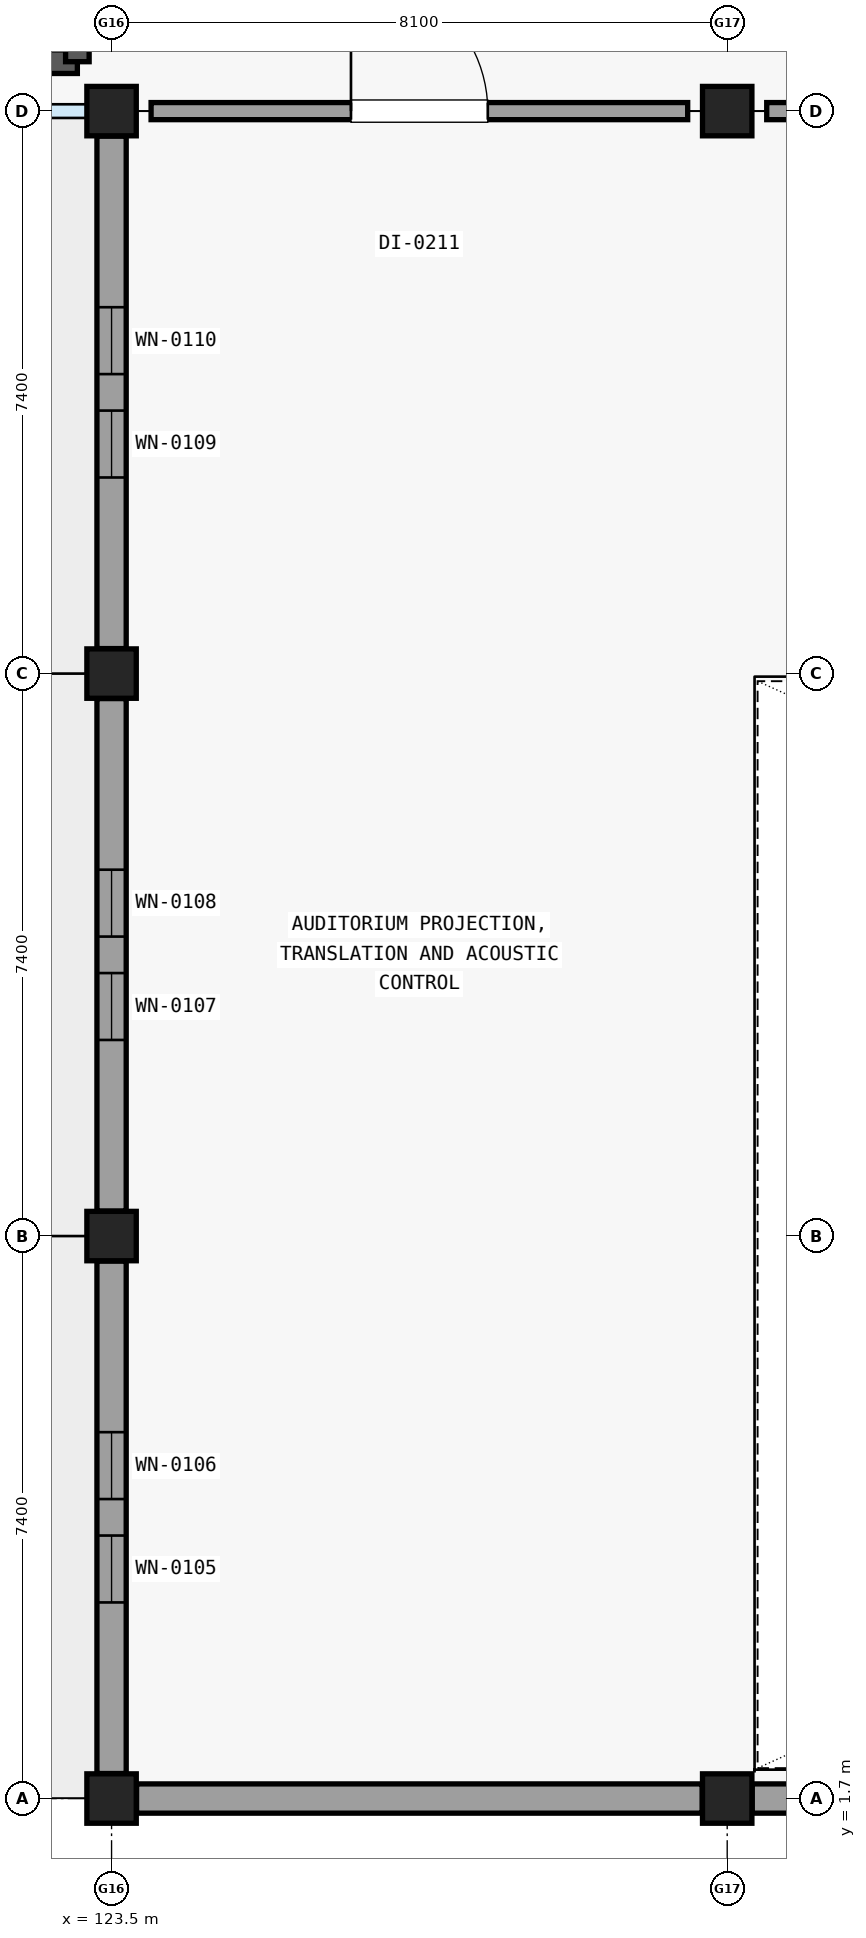
"""IFC4 building model, lengths in metres.
Left out: names, types, materials, properties, quantities, classifications, styles, units other than length and angle.
Written with IfcOpenShell. Run it as: python <this file> out.ifc"""

import sys

from ifc_helpers import new_model, si_unit, direction, frame, frame_2d, origin, origin_2d, place, context, subcontext, project, spatial, rectangle, extrude, element, fill, save


model = new_model("IFC4")
c1 = context("Model", 3, precision=1e-05, world=origin(), true_north=direction((0.0, 1.0)))
c2 = subcontext(c1, "Body", "Model", "MODEL_VIEW")
j1 = project(units=[si_unit("LENGTHUNIT", "METRE"), si_unit("PLANEANGLEUNIT", "RADIAN")], contexts=[c1])
p1 = place(None, origin())
s1 = spatial("IfcSite", under=j1, at=p1, CompositionType="ELEMENT")
p2 = place(p1, origin())
s2 = spatial("IfcBuilding", under=s1, at=p2, CompositionType="ELEMENT")
p3 = place(p2, frame((0.0, 0.0, 5.4)))
s3 = spatial("IfcBuildingStorey", under=s2, at=p3, CompositionType="ELEMENT", Elevation=5.4)
for number, where, z_axis, x_axis in (
    (1, (123.5, 1.7, 0.0), (0.0, 0.0, 1.0), (1.0, 0.0, 0.0)),
    (2, (123.5, 9.1, 0.0), (0.0, 0.0, 1.0), (1.0, 0.0, 0.0)),
    (3, (123.5, 16.5, 0.0), (0.0, 0.0, 1.0), (1.0, 0.0, 0.0)),
    (4, (123.5, 23.9, 0.0), (0.0, 0.0, 1.0), (1.0, 0.0, 0.0)),
    (5, (131.6, 1.7, 0.0), (0.0, 0.0, 1.0), (1.0, 0.0, 0.0)),
    (6, (131.6, 23.9, 0.0), (0.0, 0.0, 1.0), (1.0, 0.0, 0.0)),
):
    element("IfcColumn", number, at=place(p3, frame(where, z_axis=z_axis, x_axis=x_axis)), inside=s3, PredefinedType="COLUMN", context=c2, shape_type="SweptSolid", body=[
        extrude(rectangle(XDim=0.65, YDim=0.65, at=origin_2d()), origin(), (0.0, 0.0, 1.0), 4.56),
    ])
p4 = place(p3, frame((131.271, 1.7, 0.0), z_axis=(0.0, 0.0, 1.0), x_axis=(-1.0, 0.0, 0.0)))
e7 = element("IfcWall", 7, at=p4, inside=s3, PredefinedType="SOLIDWALL", context=c2, shape_type="SweptSolid", body=[
    extrude(rectangle(XDim=7.442, YDim=0.385, at=frame_2d((3.721, 0.0))), origin(), (0.0, 0.0, 1.0), 3.795),
])
p5 = place(p3, frame((123.5, 2.029, 0.0), z_axis=(0.0, 0.0, 1.0), x_axis=(0.0, 1.0, 0.0)))
e8 = element("IfcWall", 8, at=p5, inside=s3, PredefinedType="SOLIDWALL", context=c2, shape_type="SweptSolid", body=[
    extrude(rectangle(XDim=6.742, YDim=0.385, at=frame_2d((3.371, 0.0))), origin(), (0.0, 0.0, 1.0), 3.795),
])
p6 = place(p5, frame((2.251, 0.0, 0.65)))
e9 = element("IfcOpeningElement", 9, at=p6, cuts=e8, PredefinedType="OPENING", context=c2, shape_type="SweptSolid", body=[
    extrude(rectangle(XDim=0.88, YDim=2.9, at=frame_2d((0.44, 1.45))), frame((0.0, 0.203, 0.0), z_axis=(0.0, -1.0, 0.0), x_axis=(1.0, 0.0, 0.0)), (0.0, 0.0, 1.0), 0.405),
])
p7 = place(p5, frame((3.611, 0.0, 0.65)))
e10 = element("IfcOpeningElement", 10, at=p7, cuts=e8, PredefinedType="OPENING", context=c2, shape_type="SweptSolid", body=[
    extrude(rectangle(XDim=0.88, YDim=2.9, at=frame_2d((0.44, 1.45))), frame((0.0, 0.203, 0.0), z_axis=(0.0, -1.0, 0.0), x_axis=(1.0, 0.0, 0.0)), (0.0, 0.0, 1.0), 0.405),
])
p8 = place(p3, frame((123.5, 9.429, 0.0), z_axis=(0.0, 0.0, 1.0), x_axis=(0.0, 1.0, 0.0)))
e11 = element("IfcWall", 11, at=p8, inside=s3, PredefinedType="SOLIDWALL", context=c2, shape_type="SweptSolid", body=[
    extrude(rectangle(XDim=6.742, YDim=0.385, at=frame_2d((3.371, 0.0))), origin(), (0.0, 0.0, 1.0), 3.845),
])
p9 = place(p8, frame((2.251, 0.0, 0.65)))
e12 = element("IfcOpeningElement", 12, at=p9, cuts=e11, PredefinedType="OPENING", context=c2, shape_type="SweptSolid", body=[
    extrude(rectangle(XDim=0.88, YDim=2.9, at=frame_2d((0.44, 1.45))), frame((0.0, 0.203, 0.0), z_axis=(0.0, -1.0, 0.0), x_axis=(1.0, 0.0, 0.0)), (0.0, 0.0, 1.0), 0.405),
])
p10 = place(p8, frame((3.611, 0.0, 0.65)))
e13 = element("IfcOpeningElement", 13, at=p10, cuts=e11, PredefinedType="OPENING", context=c2, shape_type="SweptSolid", body=[
    extrude(rectangle(XDim=0.88, YDim=2.9, at=frame_2d((0.44, 1.45))), frame((0.0, 0.203, 0.0), z_axis=(0.0, -1.0, 0.0), x_axis=(1.0, 0.0, 0.0)), (0.0, 0.0, 1.0), 0.405),
])
p11 = place(p3, frame((123.5, 16.829, 0.0), z_axis=(0.0, 0.0, 1.0), x_axis=(0.0, 1.0, 0.0)))
e14 = element("IfcWall", 14, at=p11, inside=s3, PredefinedType="SOLIDWALL", context=c2, shape_type="SweptSolid", body=[
    extrude(rectangle(XDim=6.742, YDim=0.385, at=frame_2d((3.371, 0.0))), origin(), (0.0, 0.0, 1.0), 3.795),
])
p12 = place(p11, frame((2.251, 0.0, 0.65)))
e15 = element("IfcOpeningElement", 15, at=p12, cuts=e14, PredefinedType="OPENING", context=c2, shape_type="SweptSolid", body=[
    extrude(rectangle(XDim=0.88, YDim=2.9, at=frame_2d((0.44, 1.45))), frame((0.0, 0.203, 0.0), z_axis=(0.0, -1.0, 0.0), x_axis=(1.0, 0.0, 0.0)), (0.0, 0.0, 1.0), 0.405),
])
p13 = place(p11, frame((3.611, 0.0, 0.65)))
e16 = element("IfcOpeningElement", 16, at=p13, cuts=e14, PredefinedType="OPENING", context=c2, shape_type="SweptSolid", body=[
    extrude(rectangle(XDim=0.88, YDim=2.9, at=frame_2d((0.44, 1.45))), frame((0.0, 0.203, 0.0), z_axis=(0.0, -1.0, 0.0), x_axis=(1.0, 0.0, 0.0)), (0.0, 0.0, 1.0), 0.405),
])
p14 = place(p3, frame((139.371, 1.7, 0.0), z_axis=(0.0, 0.0, 1.0), x_axis=(-1.0, 0.0, 0.0)))
e17 = element("IfcWall", 17, at=p14, inside=s3, PredefinedType="SOLIDWALL", context=c2, shape_type="SweptSolid", body=[
    extrude(rectangle(XDim=7.442, YDim=0.385, at=frame_2d((3.721, 0.0))), origin(), (0.0, 0.0, 1.0), 3.92),
])
p15 = place(p3, frame((120.95, 24.55, 0.0), z_axis=(0.0, 0.0, 1.0), x_axis=(1.0, 0.0, 0.0)))
e18 = element("IfcWall", 18, at=p15, inside=s3, PredefinedType="SHEAR", context=c2, shape_type="SweptSolid", body=[
    extrude(rectangle(XDim=2.1, YDim=0.31, at=frame_2d((1.05, 0.0))), origin(), (0.0, 0.0, 1.0), 4.555),
])
p16 = place(p3, frame((123.05, 24.55, 0.0), z_axis=(0.0, 0.0, 1.0), x_axis=(0.0, 1.0, 0.0)))
e19 = element("IfcWall", 19, at=p16, inside=s3, PredefinedType="SHEAR", context=c2, shape_type="SweptSolid", body=[
    extrude(rectangle(XDim=2.6, YDim=0.31, at=frame_2d((1.3, 0.0))), origin(), (0.0, 0.0, 1.0), 4.555),
])
p17 = place(p3, frame((124.02, 23.9, 0.0), z_axis=(0.0, 0.0, 1.0), x_axis=(1.0, 0.0, 0.0)))
e20 = element("IfcWall", 20, at=p17, inside=s3, PredefinedType="PARTITIONING", context=c2, shape_type="SweptSolid", body=[
    extrude(rectangle(XDim=7.06, YDim=0.225, at=frame_2d((3.53, 0.0))), origin(), (0.0, 0.0, 1.0), 3.8),
])
p18 = place(p17, frame((2.63, 0.0, 0.0)))
e21 = element("IfcOpeningElement", 21, at=p18, cuts=e20, PredefinedType="OPENING", context=c2, shape_type="SweptSolid", body=[
    extrude(rectangle(XDim=1.8, YDim=2.4, at=frame_2d((0.9, 1.2))), frame((0.0, 0.123, 0.0), z_axis=(0.0, -1.0, 0.0), x_axis=(1.0, 0.0, 0.0)), (0.0, 0.0, 1.0), 0.245),
])
p19 = place(p3, frame((132.12, 23.9, 0.0), z_axis=(0.0, 0.0, 1.0), x_axis=(1.0, 0.0, 0.0)))
e22 = element("IfcWall", 22, at=p19, inside=s3, PredefinedType="PARTITIONING", context=c2, shape_type="SweptSolid", body=[
    extrude(rectangle(XDim=7.06, YDim=0.225, at=frame_2d((3.53, 0.0))), origin(), (0.0, 0.0, 1.0), 3.8),
])
p20 = place(p19, frame((2.63, 0.0, 0.0)))
e23 = element("IfcOpeningElement", 23, at=p20, cuts=e22, PredefinedType="OPENING", context=c2, shape_type="SweptSolid", body=[
    extrude(rectangle(XDim=1.8, YDim=2.4, at=frame_2d((0.9, 1.2))), frame((0.0, 0.123, 0.0), z_axis=(0.0, -1.0, 0.0), x_axis=(1.0, 0.0, 0.0)), (0.0, 0.0, 1.0), 0.245),
])
p21 = place(p6, origin())
e24 = element("IfcWindow", 24, at=p21, inside=s3, PartitioningType="SINGLE_PANEL", PredefinedType="WINDOW", context=c2, shape_type="SweptSolid", body=[
    extrude(rectangle(XDim=0.88, YDim=2.9, at=frame_2d((0.44, 1.45))), frame((0.0, 0.03, 0.0), z_axis=(0.0, -1.0, 0.0), x_axis=(1.0, 0.0, 0.0)), (0.0, 0.0, 1.0), 0.06),
])
fill(e9, e24)
p22 = place(p7, origin())
e25 = element("IfcWindow", 25, at=p22, inside=s3, PartitioningType="SINGLE_PANEL", PredefinedType="WINDOW", context=c2, shape_type="SweptSolid", body=[
    extrude(rectangle(XDim=0.88, YDim=2.9, at=frame_2d((0.44, 1.45))), frame((0.0, 0.03, 0.0), z_axis=(0.0, -1.0, 0.0), x_axis=(1.0, 0.0, 0.0)), (0.0, 0.0, 1.0), 0.06),
])
fill(e10, e25)
p23 = place(p9, origin())
e26 = element("IfcWindow", 26, at=p23, inside=s3, PartitioningType="SINGLE_PANEL", PredefinedType="WINDOW", context=c2, shape_type="SweptSolid", body=[
    extrude(rectangle(XDim=0.88, YDim=2.9, at=frame_2d((0.44, 1.45))), frame((0.0, 0.03, 0.0), z_axis=(0.0, -1.0, 0.0), x_axis=(1.0, 0.0, 0.0)), (0.0, 0.0, 1.0), 0.06),
])
fill(e12, e26)
p24 = place(p10, origin())
e27 = element("IfcWindow", 27, at=p24, inside=s3, PartitioningType="SINGLE_PANEL", PredefinedType="WINDOW", context=c2, shape_type="SweptSolid", body=[
    extrude(rectangle(XDim=0.88, YDim=2.9, at=frame_2d((0.44, 1.45))), frame((0.0, 0.03, 0.0), z_axis=(0.0, -1.0, 0.0), x_axis=(1.0, 0.0, 0.0)), (0.0, 0.0, 1.0), 0.06),
])
fill(e13, e27)
p25 = place(p12, origin())
e28 = element("IfcWindow", 28, at=p25, inside=s3, PartitioningType="SINGLE_PANEL", PredefinedType="WINDOW", context=c2, shape_type="SweptSolid", body=[
    extrude(rectangle(XDim=0.88, YDim=2.9, at=frame_2d((0.44, 1.45))), frame((0.0, 0.03, 0.0), z_axis=(0.0, -1.0, 0.0), x_axis=(1.0, 0.0, 0.0)), (0.0, 0.0, 1.0), 0.06),
])
fill(e15, e28)
p26 = place(p13, origin())
e29 = element("IfcWindow", 29, at=p26, inside=s3, PartitioningType="SINGLE_PANEL", PredefinedType="WINDOW", context=c2, shape_type="SweptSolid", body=[
    extrude(rectangle(XDim=0.88, YDim=2.9, at=frame_2d((0.44, 1.45))), frame((0.0, 0.03, 0.0), z_axis=(0.0, -1.0, 0.0), x_axis=(1.0, 0.0, 0.0)), (0.0, 0.0, 1.0), 0.06),
])
fill(e16, e29)
p27 = place(p18, origin())
e30 = element("IfcDoor", 30, at=p27, inside=s3, OperationType="SINGLE_SWING_LEFT", PredefinedType="DOOR", context=c2, shape_type="SweptSolid", body=[
    extrude(rectangle(XDim=1.8, YDim=2.4, at=frame_2d((0.9, 1.2))), frame((0.0, 0.025, 0.0), z_axis=(0.0, -1.0, 0.0), x_axis=(1.0, 0.0, 0.0)), (0.0, 0.0, 1.0), 0.05),
])
fill(e21, e30)
save(model, sys.argv[1])
